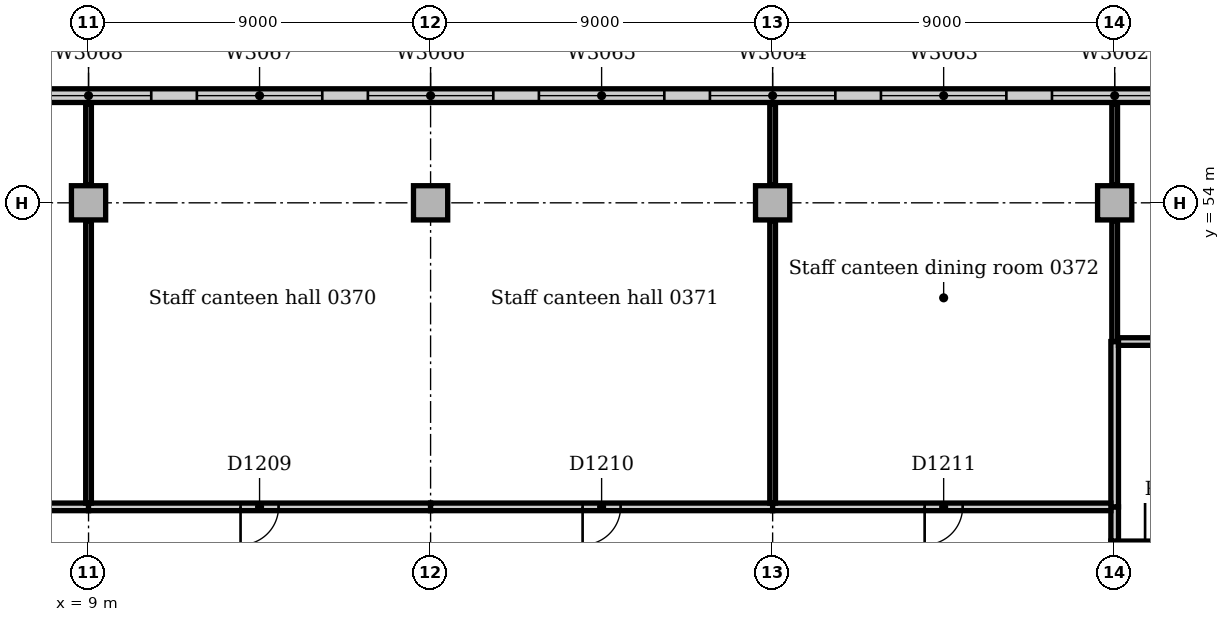
"""IFC4 building model, lengths in metres.
Left out: names, types, materials, properties, quantities, classifications, styles, units other than length and angle.
Written with IfcOpenShell. Run it as: python <this file> out.ifc"""

import sys

from ifc_helpers import new_model, si_unit, direction, frame, frame_2d, origin, origin_2d, place, context, subcontext, project, spatial, rectangle, extrude, element, fill, save


model = new_model("IFC4")
c1 = context("Model", 3, precision=1e-05, world=origin(), true_north=direction((0.0, 1.0)))
c2 = subcontext(c1, "Body", "Model", "MODEL_VIEW")
j1 = project(units=[si_unit("LENGTHUNIT", "METRE"), si_unit("PLANEANGLEUNIT", "RADIAN")], contexts=[c1])
p1 = place(None, origin())
s1 = spatial("IfcSite", under=j1, at=p1, CompositionType="ELEMENT")
p2 = place(p1, origin())
s2 = spatial("IfcBuilding", under=s1, at=p2, CompositionType="ELEMENT")
p3 = place(p2, frame((0.0, 0.0, 16.0)))
s3 = spatial("IfcBuildingStorey", under=s2, at=p3, CompositionType="ELEMENT", Elevation=16.0)
for number, where, z_axis, x_axis in (
    (1, (9.0, 54.0, 0.0), (0.0, 0.0, 1.0), (1.0, 0.0, 0.0)),
    (2, (18.0, 54.0, 0.0), (0.0, 0.0, 1.0), (1.0, 0.0, 0.0)),
    (3, (27.0, 54.0, 0.0), (0.0, 0.0, 1.0), (1.0, 0.0, 0.0)),
    (4, (36.0, 54.0, 0.0), (0.0, 0.0, 1.0), (1.0, 0.0, 0.0)),
):
    element("IfcColumn", number, at=place(p3, frame(where, z_axis=z_axis, x_axis=x_axis)), inside=s3, PredefinedType="COLUMN", context=c2, shape_type="SweptSolid", body=[
        extrude(rectangle(XDim=0.9, YDim=0.9, at=origin_2d()), origin(), (0.0, 0.0, 1.0), 4.7),
    ])
p4 = place(p3, frame((63.0, 56.82, 0.0), z_axis=(0.0, 0.0, 1.0), x_axis=(-1.0, 0.0, 0.0)))
e5 = element("IfcWall", 5, at=p4, inside=s3, PredefinedType="STANDARD", context=c2, shape_type="SweptSolid", body=[
    extrude(rectangle(XDim=144.0, YDim=0.36, at=frame_2d((72.0, 0.0))), origin(), (0.0, 0.0, 1.0), 4.7),
])
p5 = place(p4, frame((2.85, 0.0, 0.9)))
e6 = element("IfcOpeningElement", 6, at=p5, cuts=e5, PredefinedType="OPENING", context=c2, shape_type="SweptSolid", body=[
    extrude(rectangle(XDim=3.3, YDim=2.4, at=frame_2d((1.65, 1.2))), frame((0.0, 0.19, 0.0), z_axis=(0.0, -1.0, 0.0), x_axis=(1.0, 0.0, 0.0)), (0.0, 0.0, 1.0), 0.38),
])
p6 = place(p4, frame((7.35, 0.0, 0.9)))
e7 = element("IfcOpeningElement", 7, at=p6, cuts=e5, PredefinedType="OPENING", context=c2, shape_type="SweptSolid", body=[
    extrude(rectangle(XDim=3.3, YDim=2.4, at=frame_2d((1.65, 1.2))), frame((0.0, 0.19, 0.0), z_axis=(0.0, -1.0, 0.0), x_axis=(1.0, 0.0, 0.0)), (0.0, 0.0, 1.0), 0.38),
])
p7 = place(p4, frame((11.85, 0.0, 0.9)))
e8 = element("IfcOpeningElement", 8, at=p7, cuts=e5, PredefinedType="OPENING", context=c2, shape_type="SweptSolid", body=[
    extrude(rectangle(XDim=3.3, YDim=2.4, at=frame_2d((1.65, 1.2))), frame((0.0, 0.19, 0.0), z_axis=(0.0, -1.0, 0.0), x_axis=(1.0, 0.0, 0.0)), (0.0, 0.0, 1.0), 0.38),
])
p8 = place(p4, frame((16.35, 0.0, 0.9)))
e9 = element("IfcOpeningElement", 9, at=p8, cuts=e5, PredefinedType="OPENING", context=c2, shape_type="SweptSolid", body=[
    extrude(rectangle(XDim=3.3, YDim=2.4, at=frame_2d((1.65, 1.2))), frame((0.0, 0.19, 0.0), z_axis=(0.0, -1.0, 0.0), x_axis=(1.0, 0.0, 0.0)), (0.0, 0.0, 1.0), 0.38),
])
p9 = place(p4, frame((20.85, 0.0, 0.9)))
e10 = element("IfcOpeningElement", 10, at=p9, cuts=e5, PredefinedType="OPENING", context=c2, shape_type="SweptSolid", body=[
    extrude(rectangle(XDim=3.3, YDim=2.4, at=frame_2d((1.65, 1.2))), frame((0.0, 0.19, 0.0), z_axis=(0.0, -1.0, 0.0), x_axis=(1.0, 0.0, 0.0)), (0.0, 0.0, 1.0), 0.38),
])
p10 = place(p4, frame((25.35, 0.0, 0.9)))
e11 = element("IfcOpeningElement", 11, at=p10, cuts=e5, PredefinedType="OPENING", context=c2, shape_type="SweptSolid", body=[
    extrude(rectangle(XDim=3.3, YDim=2.4, at=frame_2d((1.65, 1.2))), frame((0.0, 0.19, 0.0), z_axis=(0.0, -1.0, 0.0), x_axis=(1.0, 0.0, 0.0)), (0.0, 0.0, 1.0), 0.38),
])
p11 = place(p4, frame((29.85, 0.0, 0.9)))
e12 = element("IfcOpeningElement", 12, at=p11, cuts=e5, PredefinedType="OPENING", context=c2, shape_type="SweptSolid", body=[
    extrude(rectangle(XDim=3.3, YDim=2.4, at=frame_2d((1.65, 1.2))), frame((0.0, 0.19, 0.0), z_axis=(0.0, -1.0, 0.0), x_axis=(1.0, 0.0, 0.0)), (0.0, 0.0, 1.0), 0.38),
])
p12 = place(p4, frame((34.35, 0.0, 0.9)))
e13 = element("IfcOpeningElement", 13, at=p12, cuts=e5, PredefinedType="OPENING", context=c2, shape_type="SweptSolid", body=[
    extrude(rectangle(XDim=3.3, YDim=2.4, at=frame_2d((1.65, 1.2))), frame((0.0, 0.19, 0.0), z_axis=(0.0, -1.0, 0.0), x_axis=(1.0, 0.0, 0.0)), (0.0, 0.0, 1.0), 0.38),
])
p13 = place(p4, frame((38.85, 0.0, 0.9)))
e14 = element("IfcOpeningElement", 14, at=p13, cuts=e5, PredefinedType="OPENING", context=c2, shape_type="SweptSolid", body=[
    extrude(rectangle(XDim=3.3, YDim=2.4, at=frame_2d((1.65, 1.2))), frame((0.0, 0.19, 0.0), z_axis=(0.0, -1.0, 0.0), x_axis=(1.0, 0.0, 0.0)), (0.0, 0.0, 1.0), 0.38),
])
p14 = place(p4, frame((43.35, 0.0, 0.9)))
e15 = element("IfcOpeningElement", 15, at=p14, cuts=e5, PredefinedType="OPENING", context=c2, shape_type="SweptSolid", body=[
    extrude(rectangle(XDim=3.3, YDim=2.4, at=frame_2d((1.65, 1.2))), frame((0.0, 0.19, 0.0), z_axis=(0.0, -1.0, 0.0), x_axis=(1.0, 0.0, 0.0)), (0.0, 0.0, 1.0), 0.38),
])
p15 = place(p4, frame((47.85, 0.0, 0.9)))
e16 = element("IfcOpeningElement", 16, at=p15, cuts=e5, PredefinedType="OPENING", context=c2, shape_type="SweptSolid", body=[
    extrude(rectangle(XDim=3.3, YDim=2.4, at=frame_2d((1.65, 1.2))), frame((0.0, 0.19, 0.0), z_axis=(0.0, -1.0, 0.0), x_axis=(1.0, 0.0, 0.0)), (0.0, 0.0, 1.0), 0.38),
])
p16 = place(p4, frame((52.35, 0.0, 0.9)))
e17 = element("IfcOpeningElement", 17, at=p16, cuts=e5, PredefinedType="OPENING", context=c2, shape_type="SweptSolid", body=[
    extrude(rectangle(XDim=3.3, YDim=2.4, at=frame_2d((1.65, 1.2))), frame((0.0, 0.19, 0.0), z_axis=(0.0, -1.0, 0.0), x_axis=(1.0, 0.0, 0.0)), (0.0, 0.0, 1.0), 0.38),
])
p17 = place(p4, frame((56.85, 0.0, 0.9)))
e18 = element("IfcOpeningElement", 18, at=p17, cuts=e5, PredefinedType="OPENING", context=c2, shape_type="SweptSolid", body=[
    extrude(rectangle(XDim=3.3, YDim=2.4, at=frame_2d((1.65, 1.2))), frame((0.0, 0.19, 0.0), z_axis=(0.0, -1.0, 0.0), x_axis=(1.0, 0.0, 0.0)), (0.0, 0.0, 1.0), 0.38),
])
p18 = place(p4, frame((92.85, 0.0, 0.9)))
e19 = element("IfcOpeningElement", 19, at=p18, cuts=e5, PredefinedType="OPENING", context=c2, shape_type="SweptSolid", body=[
    extrude(rectangle(XDim=3.3, YDim=2.4, at=frame_2d((1.65, 1.2))), frame((0.0, 0.19, 0.0), z_axis=(0.0, -1.0, 0.0), x_axis=(1.0, 0.0, 0.0)), (0.0, 0.0, 1.0), 0.38),
])
p19 = place(p4, frame((97.35, 0.0, 0.9)))
e20 = element("IfcOpeningElement", 20, at=p19, cuts=e5, PredefinedType="OPENING", context=c2, shape_type="SweptSolid", body=[
    extrude(rectangle(XDim=3.3, YDim=2.4, at=frame_2d((1.65, 1.2))), frame((0.0, 0.19, 0.0), z_axis=(0.0, -1.0, 0.0), x_axis=(1.0, 0.0, 0.0)), (0.0, 0.0, 1.0), 0.38),
])
p20 = place(p4, frame((101.85, 0.0, 0.9)))
e21 = element("IfcOpeningElement", 21, at=p20, cuts=e5, PredefinedType="OPENING", context=c2, shape_type="SweptSolid", body=[
    extrude(rectangle(XDim=3.3, YDim=2.4, at=frame_2d((1.65, 1.2))), frame((0.0, 0.19, 0.0), z_axis=(0.0, -1.0, 0.0), x_axis=(1.0, 0.0, 0.0)), (0.0, 0.0, 1.0), 0.38),
])
p21 = place(p4, frame((106.35, 0.0, 0.9)))
e22 = element("IfcOpeningElement", 22, at=p21, cuts=e5, PredefinedType="OPENING", context=c2, shape_type="SweptSolid", body=[
    extrude(rectangle(XDim=3.3, YDim=2.4, at=frame_2d((1.65, 1.2))), frame((0.0, 0.19, 0.0), z_axis=(0.0, -1.0, 0.0), x_axis=(1.0, 0.0, 0.0)), (0.0, 0.0, 1.0), 0.38),
])
p22 = place(p4, frame((110.85, 0.0, 0.9)))
e23 = element("IfcOpeningElement", 23, at=p22, cuts=e5, PredefinedType="OPENING", context=c2, shape_type="SweptSolid", body=[
    extrude(rectangle(XDim=3.3, YDim=2.4, at=frame_2d((1.65, 1.2))), frame((0.0, 0.19, 0.0), z_axis=(0.0, -1.0, 0.0), x_axis=(1.0, 0.0, 0.0)), (0.0, 0.0, 1.0), 0.38),
])
p23 = place(p4, frame((115.35, 0.0, 0.9)))
e24 = element("IfcOpeningElement", 24, at=p23, cuts=e5, PredefinedType="OPENING", context=c2, shape_type="SweptSolid", body=[
    extrude(rectangle(XDim=3.3, YDim=2.4, at=frame_2d((1.65, 1.2))), frame((0.0, 0.19, 0.0), z_axis=(0.0, -1.0, 0.0), x_axis=(1.0, 0.0, 0.0)), (0.0, 0.0, 1.0), 0.38),
])
p24 = place(p4, frame((119.85, 0.0, 0.9)))
e25 = element("IfcOpeningElement", 25, at=p24, cuts=e5, PredefinedType="OPENING", context=c2, shape_type="SweptSolid", body=[
    extrude(rectangle(XDim=3.3, YDim=2.4, at=frame_2d((1.65, 1.2))), frame((0.0, 0.19, 0.0), z_axis=(0.0, -1.0, 0.0), x_axis=(1.0, 0.0, 0.0)), (0.0, 0.0, 1.0), 0.38),
])
p25 = place(p4, frame((124.35, 0.0, 0.9)))
e26 = element("IfcOpeningElement", 26, at=p25, cuts=e5, PredefinedType="OPENING", context=c2, shape_type="SweptSolid", body=[
    extrude(rectangle(XDim=3.3, YDim=2.4, at=frame_2d((1.65, 1.2))), frame((0.0, 0.19, 0.0), z_axis=(0.0, -1.0, 0.0), x_axis=(1.0, 0.0, 0.0)), (0.0, 0.0, 1.0), 0.38),
])
p26 = place(p4, frame((128.85, 0.0, 0.9)))
e27 = element("IfcOpeningElement", 27, at=p26, cuts=e5, PredefinedType="OPENING", context=c2, shape_type="SweptSolid", body=[
    extrude(rectangle(XDim=3.3, YDim=2.4, at=frame_2d((1.65, 1.2))), frame((0.0, 0.19, 0.0), z_axis=(0.0, -1.0, 0.0), x_axis=(1.0, 0.0, 0.0)), (0.0, 0.0, 1.0), 0.38),
])
p27 = place(p4, frame((133.35, 0.0, 0.9)))
e28 = element("IfcOpeningElement", 28, at=p27, cuts=e5, PredefinedType="OPENING", context=c2, shape_type="SweptSolid", body=[
    extrude(rectangle(XDim=3.3, YDim=2.4, at=frame_2d((1.65, 1.2))), frame((0.0, 0.19, 0.0), z_axis=(0.0, -1.0, 0.0), x_axis=(1.0, 0.0, 0.0)), (0.0, 0.0, 1.0), 0.38),
])
p28 = place(p4, frame((137.85, 0.0, 0.9)))
e29 = element("IfcOpeningElement", 29, at=p28, cuts=e5, PredefinedType="OPENING", context=c2, shape_type="SweptSolid", body=[
    extrude(rectangle(XDim=3.3, YDim=2.4, at=frame_2d((1.65, 1.2))), frame((0.0, 0.19, 0.0), z_axis=(0.0, -1.0, 0.0), x_axis=(1.0, 0.0, 0.0)), (0.0, 0.0, 1.0), 0.38),
])
p29 = place(p3, frame((35.9, 45.0, 0.0), z_axis=(0.0, 0.0, 1.0), x_axis=(1.0, 0.0, 0.0)))
e30 = element("IfcWall", 30, at=p29, inside=s3, PredefinedType="SOLIDWALL", context=c2, shape_type="SweptSolid", body=[
    extrude(rectangle(XDim=9.2, YDim=0.2, at=frame_2d((4.6, 0.0))), origin(), (0.0, 0.0, 1.0), 4.7),
])
p30 = place(p29, frame((0.9, 0.0, 0.0)))
e31 = element("IfcOpeningElement", 31, at=p30, cuts=e30, PredefinedType="OPENING", context=c2, shape_type="SweptSolid", body=[
    extrude(rectangle(XDim=1.2, YDim=2.1, at=frame_2d((0.6, 1.05))), frame((0.0, 0.11, 0.0), z_axis=(0.0, -1.0, 0.0), x_axis=(1.0, 0.0, 0.0)), (0.0, 0.0, 1.0), 0.22),
])
p31 = place(p3, frame((36.0, 45.1, 0.0), z_axis=(0.0, 0.0, 1.0), x_axis=(0.0, 1.0, 0.0)))
e32 = element("IfcWall", 32, at=p31, inside=s3, PredefinedType="SOLIDWALL", context=c2, shape_type="SweptSolid", body=[
    extrude(rectangle(XDim=0.9, YDim=0.2, at=frame_2d((0.45, 0.0))), origin(), (0.0, 0.0, 1.0), 4.7),
])
p32 = place(p3, frame((36.0, 46.0, 0.0), z_axis=(0.0, 0.0, 1.0), x_axis=(0.0, 1.0, 0.0)))
e33 = element("IfcWall", 33, at=p32, inside=s3, PredefinedType="SOLIDWALL", context=c2, shape_type="SweptSolid", body=[
    extrude(rectangle(XDim=4.35, YDim=0.2, at=frame_2d((2.175, 0.0))), origin(), (0.0, 0.0, 1.0), 4.7),
])
p33 = place(p3, frame((36.1, 50.35, 0.0), z_axis=(0.0, 0.0, 1.0), x_axis=(1.0, 0.0, 0.0)))
e34 = element("IfcWall", 34, at=p33, inside=s3, PredefinedType="SOLIDWALL", context=c2, shape_type="SweptSolid", body=[
    extrude(rectangle(XDim=9.0, YDim=0.2, at=frame_2d((4.5, 0.0))), origin(), (0.0, 0.0, 1.0), 4.7),
])
p34 = place(p3, frame((0.1, 46.0, 0.0), z_axis=(0.0, 0.0, 1.0), x_axis=(1.0, 0.0, 0.0)))
e35 = element("IfcWall", 35, at=p34, inside=s3, PredefinedType="PARTITIONING", context=c2, shape_type="SweptSolid", body=[
    extrude(rectangle(XDim=8.9, YDim=0.2, at=frame_2d((4.45, 0.0))), origin(), (0.0, 0.0, 1.0), 4.7),
])
p35 = place(p34, frame((3.9, 0.0, 0.0)))
e36 = element("IfcOpeningElement", 36, at=p35, cuts=e35, PredefinedType="OPENING", context=c2, shape_type="SweptSolid", body=[
    extrude(rectangle(XDim=1.0, YDim=2.1, at=frame_2d((0.5, 1.05))), frame((0.0, 0.11, 0.0), z_axis=(0.0, -1.0, 0.0), x_axis=(1.0, 0.0, 0.0)), (0.0, 0.0, 1.0), 0.22),
])
p36 = place(p3, frame((9.0, 46.0, 0.0), z_axis=(0.0, 0.0, 1.0), x_axis=(1.0, 0.0, 0.0)))
e37 = element("IfcWall", 37, at=p36, inside=s3, PredefinedType="PARTITIONING", context=c2, shape_type="SweptSolid", body=[
    extrude(rectangle(XDim=9.0, YDim=0.2, at=frame_2d((4.5, 0.0))), origin(), (0.0, 0.0, 1.0), 4.7),
])
p37 = place(p36, frame((4.0, 0.0, 0.0)))
e38 = element("IfcOpeningElement", 38, at=p37, cuts=e37, PredefinedType="OPENING", context=c2, shape_type="SweptSolid", body=[
    extrude(rectangle(XDim=1.0, YDim=2.1, at=frame_2d((0.5, 1.05))), frame((0.0, 0.11, 0.0), z_axis=(0.0, -1.0, 0.0), x_axis=(1.0, 0.0, 0.0)), (0.0, 0.0, 1.0), 0.22),
])
p38 = place(p3, frame((18.0, 46.0, 0.0), z_axis=(0.0, 0.0, 1.0), x_axis=(1.0, 0.0, 0.0)))
e39 = element("IfcWall", 39, at=p38, inside=s3, PredefinedType="PARTITIONING", context=c2, shape_type="SweptSolid", body=[
    extrude(rectangle(XDim=9.0, YDim=0.2, at=frame_2d((4.5, 0.0))), origin(), (0.0, 0.0, 1.0), 4.7),
])
p39 = place(p38, frame((4.0, 0.0, 0.0)))
e40 = element("IfcOpeningElement", 40, at=p39, cuts=e39, PredefinedType="OPENING", context=c2, shape_type="SweptSolid", body=[
    extrude(rectangle(XDim=1.0, YDim=2.1, at=frame_2d((0.5, 1.05))), frame((0.0, 0.11, 0.0), z_axis=(0.0, -1.0, 0.0), x_axis=(1.0, 0.0, 0.0)), (0.0, 0.0, 1.0), 0.22),
])
p40 = place(p3, frame((27.0, 46.0, 0.0), z_axis=(0.0, 0.0, 1.0), x_axis=(1.0, 0.0, 0.0)))
e41 = element("IfcWall", 41, at=p40, inside=s3, PredefinedType="PARTITIONING", context=c2, shape_type="SweptSolid", body=[
    extrude(rectangle(XDim=8.9, YDim=0.2, at=frame_2d((4.45, 0.0))), origin(), (0.0, 0.0, 1.0), 4.7),
])
p41 = place(p40, frame((4.0, 0.0, 0.0)))
e42 = element("IfcOpeningElement", 42, at=p41, cuts=e41, PredefinedType="OPENING", context=c2, shape_type="SweptSolid", body=[
    extrude(rectangle(XDim=1.0, YDim=2.1, at=frame_2d((0.5, 1.05))), frame((0.0, 0.11, 0.0), z_axis=(0.0, -1.0, 0.0), x_axis=(1.0, 0.0, 0.0)), (0.0, 0.0, 1.0), 0.22),
])
p42 = place(p3, frame((9.0, 46.1, 0.0), z_axis=(0.0, 0.0, 1.0), x_axis=(0.0, 1.0, 0.0)))
e43 = element("IfcWall", 43, at=p42, inside=s3, PredefinedType="PARTITIONING", context=c2, shape_type="SweptSolid", body=[
    extrude(rectangle(XDim=7.43, YDim=0.15, at=frame_2d((3.715, 0.0))), origin(), (0.0, 0.0, 1.0), 4.7),
])
p43 = place(p3, frame((9.0, 54.47, 0.0), z_axis=(0.0, 0.0, 1.0), x_axis=(0.0, 1.0, 0.0)))
e44 = element("IfcWall", 44, at=p43, inside=s3, PredefinedType="PARTITIONING", context=c2, shape_type="SweptSolid", body=[
    extrude(rectangle(XDim=2.13, YDim=0.15, at=frame_2d((1.065, 0.0))), origin(), (0.0, 0.0, 1.0), 4.7),
])
p44 = place(p3, frame((27.0, 46.1, 0.0), z_axis=(0.0, 0.0, 1.0), x_axis=(0.0, 1.0, 0.0)))
e45 = element("IfcWall", 45, at=p44, inside=s3, PredefinedType="PARTITIONING", context=c2, shape_type="SweptSolid", body=[
    extrude(rectangle(XDim=7.43, YDim=0.15, at=frame_2d((3.715, 0.0))), origin(), (0.0, 0.0, 1.0), 4.7),
])
p45 = place(p3, frame((27.0, 54.47, 0.0), z_axis=(0.0, 0.0, 1.0), x_axis=(0.0, 1.0, 0.0)))
e46 = element("IfcWall", 46, at=p45, inside=s3, PredefinedType="PARTITIONING", context=c2, shape_type="SweptSolid", body=[
    extrude(rectangle(XDim=2.13, YDim=0.15, at=frame_2d((1.065, 0.0))), origin(), (0.0, 0.0, 1.0), 4.7),
])
p46 = place(p3, frame((36.0, 50.35, 0.0), z_axis=(0.0, 0.0, 1.0), x_axis=(0.0, 1.0, 0.0)))
e47 = element("IfcWall", 47, at=p46, inside=s3, PredefinedType="PARTITIONING", context=c2, shape_type="SweptSolid", body=[
    extrude(rectangle(XDim=3.18, YDim=0.15, at=frame_2d((1.59, 0.0))), origin(), (0.0, 0.0, 1.0), 4.7),
])
p47 = place(p3, frame((36.0, 54.47, 0.0), z_axis=(0.0, 0.0, 1.0), x_axis=(0.0, 1.0, 0.0)))
e48 = element("IfcWall", 48, at=p47, inside=s3, PredefinedType="PARTITIONING", context=c2, shape_type="SweptSolid", body=[
    extrude(rectangle(XDim=2.13, YDim=0.15, at=frame_2d((1.065, 0.0))), origin(), (0.0, 0.0, 1.0), 4.7),
])
p48 = place(p10, origin())
e49 = element("IfcWindow", 49, at=p48, inside=s3, PartitioningType="SINGLE_PANEL", PredefinedType="WINDOW", context=c2, shape_type="SweptSolid", body=[
    extrude(rectangle(XDim=3.3, YDim=2.4, at=frame_2d((1.65, 1.2))), frame((0.0, 0.13, 0.0), z_axis=(0.0, -1.0, 0.0), x_axis=(1.0, 0.0, 0.0)), (0.0, 0.0, 1.0), 0.06),
])
fill(e11, e49)
p49 = place(p11, origin())
e50 = element("IfcWindow", 50, at=p49, inside=s3, PartitioningType="SINGLE_PANEL", PredefinedType="WINDOW", context=c2, shape_type="SweptSolid", body=[
    extrude(rectangle(XDim=3.3, YDim=2.4, at=frame_2d((1.65, 1.2))), frame((0.0, 0.13, 0.0), z_axis=(0.0, -1.0, 0.0), x_axis=(1.0, 0.0, 0.0)), (0.0, 0.0, 1.0), 0.06),
])
fill(e12, e50)
p50 = place(p12, origin())
e51 = element("IfcWindow", 51, at=p50, inside=s3, PartitioningType="SINGLE_PANEL", PredefinedType="WINDOW", context=c2, shape_type="SweptSolid", body=[
    extrude(rectangle(XDim=3.3, YDim=2.4, at=frame_2d((1.65, 1.2))), frame((0.0, 0.13, 0.0), z_axis=(0.0, -1.0, 0.0), x_axis=(1.0, 0.0, 0.0)), (0.0, 0.0, 1.0), 0.06),
])
fill(e13, e51)
p51 = place(p13, origin())
e52 = element("IfcWindow", 52, at=p51, inside=s3, PartitioningType="SINGLE_PANEL", PredefinedType="WINDOW", context=c2, shape_type="SweptSolid", body=[
    extrude(rectangle(XDim=3.3, YDim=2.4, at=frame_2d((1.65, 1.2))), frame((0.0, 0.13, 0.0), z_axis=(0.0, -1.0, 0.0), x_axis=(1.0, 0.0, 0.0)), (0.0, 0.0, 1.0), 0.06),
])
fill(e14, e52)
p52 = place(p14, origin())
e53 = element("IfcWindow", 53, at=p52, inside=s3, PartitioningType="SINGLE_PANEL", PredefinedType="WINDOW", context=c2, shape_type="SweptSolid", body=[
    extrude(rectangle(XDim=3.3, YDim=2.4, at=frame_2d((1.65, 1.2))), frame((0.0, 0.13, 0.0), z_axis=(0.0, -1.0, 0.0), x_axis=(1.0, 0.0, 0.0)), (0.0, 0.0, 1.0), 0.06),
])
fill(e15, e53)
p53 = place(p15, origin())
e54 = element("IfcWindow", 54, at=p53, inside=s3, PartitioningType="SINGLE_PANEL", PredefinedType="WINDOW", context=c2, shape_type="SweptSolid", body=[
    extrude(rectangle(XDim=3.3, YDim=2.4, at=frame_2d((1.65, 1.2))), frame((0.0, 0.13, 0.0), z_axis=(0.0, -1.0, 0.0), x_axis=(1.0, 0.0, 0.0)), (0.0, 0.0, 1.0), 0.06),
])
fill(e16, e54)
p54 = place(p16, origin())
e55 = element("IfcWindow", 55, at=p54, inside=s3, PartitioningType="SINGLE_PANEL", PredefinedType="WINDOW", context=c2, shape_type="SweptSolid", body=[
    extrude(rectangle(XDim=3.3, YDim=2.4, at=frame_2d((1.65, 1.2))), frame((0.0, 0.13, 0.0), z_axis=(0.0, -1.0, 0.0), x_axis=(1.0, 0.0, 0.0)), (0.0, 0.0, 1.0), 0.06),
])
fill(e17, e55)
p55 = place(p37, frame((1.0, 0.0, 0.0), z_axis=(0.0, 0.0, 1.0), x_axis=(-1.0, 0.0, 0.0)))
e56 = element("IfcDoor", 56, at=p55, inside=s3, OperationType="SINGLE_SWING_RIGHT", PredefinedType="DOOR", context=c2, shape_type="SweptSolid", body=[
    extrude(rectangle(XDim=1.0, YDim=2.1, at=frame_2d((0.5, 1.05))), frame((0.0, 0.025, 0.0), z_axis=(0.0, -1.0, 0.0), x_axis=(1.0, 0.0, 0.0)), (0.0, 0.0, 1.0), 0.05),
])
fill(e38, e56)
p56 = place(p39, frame((1.0, 0.0, 0.0), z_axis=(0.0, 0.0, 1.0), x_axis=(-1.0, 0.0, 0.0)))
e57 = element("IfcDoor", 57, at=p56, inside=s3, OperationType="SINGLE_SWING_RIGHT", PredefinedType="DOOR", context=c2, shape_type="SweptSolid", body=[
    extrude(rectangle(XDim=1.0, YDim=2.1, at=frame_2d((0.5, 1.05))), frame((0.0, 0.025, 0.0), z_axis=(0.0, -1.0, 0.0), x_axis=(1.0, 0.0, 0.0)), (0.0, 0.0, 1.0), 0.05),
])
fill(e40, e57)
p57 = place(p41, frame((1.0, 0.0, 0.0), z_axis=(0.0, 0.0, 1.0), x_axis=(-1.0, 0.0, 0.0)))
e58 = element("IfcDoor", 58, at=p57, inside=s3, OperationType="SINGLE_SWING_RIGHT", PredefinedType="DOOR", context=c2, shape_type="SweptSolid", body=[
    extrude(rectangle(XDim=1.0, YDim=2.1, at=frame_2d((0.5, 1.05))), frame((0.0, 0.025, 0.0), z_axis=(0.0, -1.0, 0.0), x_axis=(1.0, 0.0, 0.0)), (0.0, 0.0, 1.0), 0.05),
])
fill(e42, e58)
save(model, sys.argv[1])
